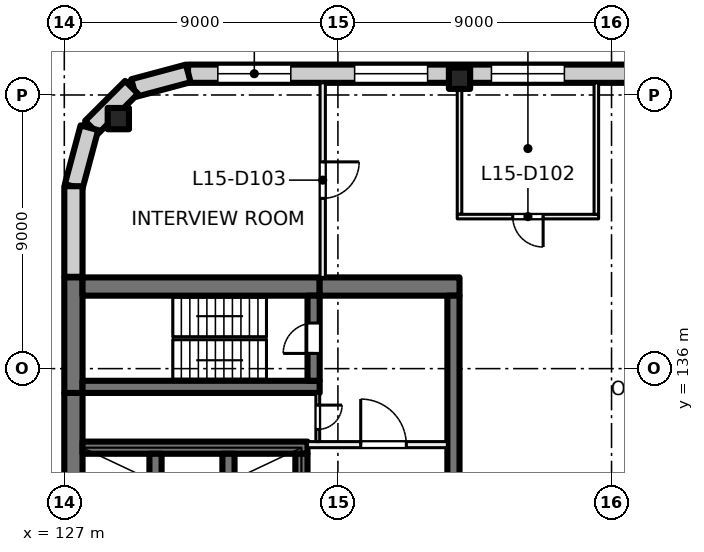
"""IFC4 building model, lengths in metres.
Left out: names, types, materials, properties, quantities, classifications, styles, units other than length and angle.
Written with IfcOpenShell. Run it as: python <this file> out.ifc"""

import sys

from ifc_helpers import new_model, si_unit, direction, frame, frame_2d, origin, origin_2d, place, context, subcontext, project, spatial, rectangle, extrude, element, fill, save


model = new_model("IFC4")
c1 = context("Model", 3, precision=1e-05, world=origin(), true_north=direction((0.0, 1.0)))
c2 = subcontext(c1, "Body", "Model", "MODEL_VIEW")
j1 = project(units=[si_unit("LENGTHUNIT", "METRE"), si_unit("PLANEANGLEUNIT", "RADIAN")], contexts=[c1])
p1 = place(None, origin())
s1 = spatial("IfcSite", under=j1, at=p1, CompositionType="ELEMENT")
p2 = place(p1, origin())
s2 = spatial("IfcBuilding", under=s1, at=p2, CompositionType="ELEMENT")
p3 = place(p2, frame((0.0, 0.0, 67.5)))
s3 = spatial("IfcBuildingStorey", under=s2, at=p3, CompositionType="ELEMENT", Elevation=67.5)
for number, where, z_axis, x_axis in (
    (1, (128.777, 144.223, 0.0), (0.0, 0.0, 1.0), (1.0, 0.0, 0.0)),
    (2, (140.0, 145.55, 0.0), (0.0, 0.0, 1.0), (1.0, 0.0, 0.0)),
):
    element("IfcColumn", number, at=place(p3, frame(where, z_axis=z_axis, x_axis=x_axis)), inside=s3, PredefinedType="COLUMN", context=c2, shape_type="SweptSolid", body=[
        extrude(rectangle(XDim=0.7, YDim=0.7, at=origin_2d()), origin(), (0.0, 0.0, 1.0), 4.0),
    ])
p4 = place(p3, frame((127.3, 120.8, 0.0), z_axis=(0.0, 0.0, 1.0), x_axis=(0.0, 1.0, 0.0)))
e3 = element("IfcWall", 3, at=p4, inside=s3, PredefinedType="SHEAR", context=c2, shape_type="SweptSolid", body=[
    extrude(rectangle(XDim=14.4, YDim=0.6, at=frame_2d((7.2, 0.0))), origin(), (0.0, 0.0, 1.0), 4.0),
])
p5 = place(p3, frame((127.3, 135.2, 0.0), z_axis=(0.0, 0.0, 1.0), x_axis=(0.0, 1.0, 0.0)))
e4 = element("IfcWall", 4, at=p5, inside=s3, PredefinedType="SHEAR", context=c2, shape_type="SweptSolid", body=[
    extrude(rectangle(XDim=3.8, YDim=0.6, at=frame_2d((1.9, 0.0))), origin(), (0.0, 0.0, 1.0), 4.0),
])
p6 = place(p3, frame((127.6, 138.7, 0.0), z_axis=(0.0, 0.0, 1.0), x_axis=(1.0, 0.0, 0.0)))
e5 = element("IfcWall", 5, at=p6, inside=s3, PredefinedType="SHEAR", context=c2, shape_type="SweptSolid", body=[
    extrude(rectangle(XDim=7.8, YDim=0.6, at=frame_2d((3.9, 0.0))), origin(), (0.0, 0.0, 1.0), 4.0),
])
p7 = place(p3, frame((135.4, 138.7, 0.0), z_axis=(0.0, 0.0, 1.0), x_axis=(1.0, 0.0, 0.0)))
e6 = element("IfcWall", 6, at=p7, inside=s3, PredefinedType="SHEAR", context=c2, shape_type="SweptSolid", body=[
    extrude(rectangle(XDim=4.6, YDim=0.6, at=frame_2d((2.3, 0.0))), origin(), (0.0, 0.0, 1.0), 4.0),
])
p8 = place(p3, frame((127.6, 135.4, 0.0), z_axis=(0.0, 0.0, 1.0), x_axis=(1.0, 0.0, 0.0)))
e7 = element("IfcWall", 7, at=p8, inside=s3, PredefinedType="SHEAR", context=c2, shape_type="SweptSolid", body=[
    extrude(rectangle(XDim=7.8, YDim=0.4, at=frame_2d((3.9, 0.0))), origin(), (0.0, 0.0, 1.0), 4.0),
])
p9 = place(p3, frame((135.2, 135.6, 0.0), z_axis=(0.0, 0.0, 1.0), x_axis=(0.0, 1.0, 0.0)))
e8 = element("IfcWall", 8, at=p9, inside=s3, PredefinedType="SHEAR", context=c2, shape_type="SweptSolid", body=[
    extrude(rectangle(XDim=2.8, YDim=0.4, at=frame_2d((1.4, 0.0))), origin(), (0.0, 0.0, 1.0), 4.0),
])
p10 = place(p9, frame((0.9, 0.0, 0.0)))
e9 = element("IfcOpeningElement", 9, at=p10, cuts=e8, PredefinedType="OPENING", context=c2, shape_type="SweptSolid", body=[
    extrude(rectangle(XDim=1.0, YDim=2.1, at=frame_2d((0.5, 1.05))), frame((0.0, 0.21, 0.0), z_axis=(0.0, -1.0, 0.0), x_axis=(1.0, 0.0, 0.0)), (0.0, 0.0, 1.0), 0.42),
])
p11 = place(p3, frame((127.6, 133.4, 0.0), z_axis=(0.0, 0.0, 1.0), x_axis=(1.0, 0.0, 0.0)))
e10 = element("IfcWall", 10, at=p11, inside=s3, PredefinedType="SHEAR", context=c2, shape_type="SweptSolid", body=[
    extrude(rectangle(XDim=7.4, YDim=0.4, at=frame_2d((3.7, 0.0))), origin(), (0.0, 0.0, 1.0), 4.0),
])
for number, where, z_axis, x_axis in (
    (11, (130.0, 130.2, 0.0), (0.0, 0.0, 1.0), (0.0, 1.0, 0.0)),
    (12, (132.4, 130.2, 0.0), (0.0, 0.0, 1.0), (0.0, 1.0, 0.0)),
):
    element("IfcWall", number, at=place(p3, frame(where, z_axis=z_axis, x_axis=x_axis)), inside=s3, PredefinedType="SHEAR", context=c2, shape_type="SweptSolid", body=[
        extrude(rectangle(XDim=3.0, YDim=0.4, at=frame_2d((1.5, 0.0))), origin(), (0.0, 0.0, 1.0), 4.0),
    ])
p12 = place(p3, frame((134.8, 130.2, 0.0), z_axis=(0.0, 0.0, 1.0), x_axis=(0.0, 1.0, 0.0)))
e13 = element("IfcWall", 13, at=p12, inside=s3, PredefinedType="SHEAR", context=c2, shape_type="SweptSolid", body=[
    extrude(rectangle(XDim=3.0, YDim=0.4, at=frame_2d((1.5, 0.0))), origin(), (0.0, 0.0, 1.0), 4.0),
])
p13 = place(p12, frame((0.95, 0.0, 0.0)))
e14 = element("IfcOpeningElement", 14, at=p13, cuts=e13, PredefinedType="OPENING", context=c2, shape_type="SweptSolid", body=[
    extrude(rectangle(XDim=1.1, YDim=2.1, at=frame_2d((0.55, 1.05))), frame((0.0, 0.21, 0.0), z_axis=(0.0, -1.0, 0.0), x_axis=(1.0, 0.0, 0.0)), (0.0, 0.0, 1.0), 0.42),
])
p14 = place(p3, frame((139.8, 129.8, 0.0), z_axis=(0.0, 0.0, 1.0), x_axis=(0.0, 1.0, 0.0)))
e15 = element("IfcWall", 15, at=p14, inside=s3, PredefinedType="SHEAR", context=c2, shape_type="SweptSolid", body=[
    extrude(rectangle(XDim=8.6, YDim=0.4, at=frame_2d((4.3, 0.0))), origin(), (0.0, 0.0, 1.0), 4.0),
])
p15 = place(p3, frame((131.07, 145.7, 0.0), z_axis=(0.0, 0.0, 1.0), x_axis=(1.0, 0.0, 0.0)))
e16 = element("IfcWall", 16, at=p15, inside=s3, PredefinedType="SOLIDWALL", context=c2, shape_type="SweptSolid", body=[
    extrude(rectangle(XDim=31.93, YDim=0.6, at=frame_2d((15.965, 0.0))), origin(), (0.0, 0.0, 1.0), 3.625),
])
p16 = place(p15, frame((0.98, 0.0, 0.9)))
e17 = element("IfcOpeningElement", 17, at=p16, cuts=e16, PredefinedType="OPENING", context=c2, shape_type="SweptSolid", body=[
    extrude(rectangle(XDim=2.4, YDim=2.4, at=frame_2d((1.2, 1.2))), frame((0.0, 0.31, 0.0), z_axis=(0.0, -1.0, 0.0), x_axis=(1.0, 0.0, 0.0)), (0.0, 0.0, 1.0), 0.62),
])
p17 = place(p15, frame((5.48, 0.0, 0.9)))
e18 = element("IfcOpeningElement", 18, at=p17, cuts=e16, PredefinedType="OPENING", context=c2, shape_type="SweptSolid", body=[
    extrude(rectangle(XDim=2.4, YDim=2.4, at=frame_2d((1.2, 1.2))), frame((0.0, 0.31, 0.0), z_axis=(0.0, -1.0, 0.0), x_axis=(1.0, 0.0, 0.0)), (0.0, 0.0, 1.0), 0.62),
])
p18 = place(p15, frame((9.98, 0.0, 0.9)))
e19 = element("IfcOpeningElement", 19, at=p18, cuts=e16, PredefinedType="OPENING", context=c2, shape_type="SweptSolid", body=[
    extrude(rectangle(XDim=2.4, YDim=2.4, at=frame_2d((1.2, 1.2))), frame((0.0, 0.31, 0.0), z_axis=(0.0, -1.0, 0.0), x_axis=(1.0, 0.0, 0.0)), (0.0, 0.0, 1.0), 0.62),
])
p19 = place(p15, frame((14.48, 0.0, 0.9)))
e20 = element("IfcOpeningElement", 20, at=p19, cuts=e16, PredefinedType="OPENING", context=c2, shape_type="SweptSolid", body=[
    extrude(rectangle(XDim=2.4, YDim=2.4, at=frame_2d((1.2, 1.2))), frame((0.0, 0.31, 0.0), z_axis=(0.0, -1.0, 0.0), x_axis=(1.0, 0.0, 0.0)), (0.0, 0.0, 1.0), 0.62),
])
p20 = place(p15, frame((18.98, 0.0, 0.9)))
e21 = element("IfcOpeningElement", 21, at=p20, cuts=e16, PredefinedType="OPENING", context=c2, shape_type="SweptSolid", body=[
    extrude(rectangle(XDim=2.4, YDim=2.4, at=frame_2d((1.2, 1.2))), frame((0.0, 0.31, 0.0), z_axis=(0.0, -1.0, 0.0), x_axis=(1.0, 0.0, 0.0)), (0.0, 0.0, 1.0), 0.62),
])
p21 = place(p15, frame((23.48, 0.0, 0.9)))
e22 = element("IfcOpeningElement", 22, at=p21, cuts=e16, PredefinedType="OPENING", context=c2, shape_type="SweptSolid", body=[
    extrude(rectangle(XDim=2.4, YDim=2.4, at=frame_2d((1.2, 1.2))), frame((0.0, 0.31, 0.0), z_axis=(0.0, -1.0, 0.0), x_axis=(1.0, 0.0, 0.0)), (0.0, 0.0, 1.0), 0.62),
])
p22 = place(p15, frame((27.98, 0.0, 0.9)))
e23 = element("IfcOpeningElement", 23, at=p22, cuts=e16, PredefinedType="OPENING", context=c2, shape_type="SweptSolid", body=[
    extrude(rectangle(XDim=2.4, YDim=2.4, at=frame_2d((1.2, 1.2))), frame((0.0, 0.31, 0.0), z_axis=(0.0, -1.0, 0.0), x_axis=(1.0, 0.0, 0.0)), (0.0, 0.0, 1.0), 0.62),
])
for number, where, z_axis, x_axis in (
    (24, (129.281, 145.229, 0.0), (0.0, 0.0, 1.0), (0.966, 0.259, 0.0)),
    (25, (127.896, 143.936, 0.0), (0.0, 0.0, 1.0), (0.707, 0.707, 0.0)),
):
    element("IfcWall", number, at=place(p3, frame(where, z_axis=z_axis, x_axis=x_axis)), inside=s3, PredefinedType="SOLIDWALL", context=c2, shape_type="SweptSolid", body=[
        extrude(rectangle(XDim=1.861, YDim=0.6, at=frame_2d((0.93, 0.0))), origin(), (0.0, 0.0, 1.0), 3.625),
    ])
p23 = place(p3, frame((127.308, 141.99, 0.0), z_axis=(0.0, 0.0, 1.0), x_axis=(0.258839784042, 0.965920269068, 0.0)))
e26 = element("IfcWall", 26, at=p23, inside=s3, PredefinedType="SOLIDWALL", context=c2, shape_type="SweptSolid", body=[
    extrude(rectangle(XDim=2.0, YDim=0.6, at=frame_2d((1.0, 0.0))), origin(), (0.0, 0.0, 1.0), 3.625),
])
p24 = place(p3, frame((127.3, 139.02, 0.0), z_axis=(0.0, 0.0, 1.0), x_axis=(0.0, 1.0, 0.0)))
e27 = element("IfcWall", 27, at=p24, inside=s3, PredefinedType="SOLIDWALL", context=c2, shape_type="SweptSolid", body=[
    extrude(rectangle(XDim=2.98, YDim=0.6, at=frame_2d((1.49, 0.0))), origin(), (0.0, 0.0, 1.0), 3.625),
])
p25 = place(p3, frame((135.0, 133.5, 0.0), z_axis=(0.0, 0.0, 1.0), x_axis=(1.0, 0.0, 0.0)))
e28 = element("IfcWall", 28, at=p25, inside=s3, PredefinedType="PARTITIONING", context=c2, shape_type="SweptSolid", body=[
    extrude(rectangle(XDim=4.6, YDim=0.2, at=frame_2d((2.3, 0.0))), origin(), (0.0, 0.0, 1.0), 3.625),
])
p26 = place(p25, frame((1.75, 0.0, 0.0)))
e29 = element("IfcOpeningElement", 29, at=p26, cuts=e28, PredefinedType="OPENING", context=c2, shape_type="SweptSolid", body=[
    extrude(rectangle(XDim=1.5, YDim=2.1, at=frame_2d((0.75, 1.05))), frame((0.0, 0.11, 0.0), z_axis=(0.0, -1.0, 0.0), x_axis=(1.0, 0.0, 0.0)), (0.0, 0.0, 1.0), 0.22),
])
p27 = place(p3, frame((135.337, 135.2, 0.0), z_axis=(0.0, 0.0, 1.0), x_axis=(0.0, -1.0, 0.0)))
e30 = element("IfcWall", 30, at=p27, inside=s3, PredefinedType="PARTITIONING", context=c2, shape_type="SweptSolid", body=[
    extrude(rectangle(XDim=1.6, YDim=0.125, at=frame_2d((0.8, 0.0))), origin(), (0.0, 0.0, 1.0), 3.625),
])
p28 = place(p27, frame((0.4, 0.0, 0.0)))
e31 = element("IfcOpeningElement", 31, at=p28, cuts=e30, PredefinedType="OPENING", context=c2, shape_type="SweptSolid", body=[
    extrude(rectangle(XDim=0.8, YDim=2.1, at=frame_2d((0.4, 1.05))), frame((0.0, 0.073, 0.0), z_axis=(0.0, -1.0, 0.0), x_axis=(1.0, 0.0, 0.0)), (0.0, 0.0, 1.0), 0.145),
])
p29 = place(p3, frame((135.5, 145.4, 0.0), z_axis=(0.0, 0.0, 1.0), x_axis=(0.0, -1.0, 0.0)))
e32 = element("IfcWall", 32, at=p29, inside=s3, PredefinedType="PARTITIONING", context=c2, shape_type="SweptSolid", body=[
    extrude(rectangle(XDim=6.4, YDim=0.175, at=frame_2d((3.2, 0.0))), origin(), (0.0, 0.0, 1.0), 3.625),
])
p30 = place(p29, frame((2.6, 0.0, 0.0)))
e33 = element("IfcOpeningElement", 33, at=p30, cuts=e32, PredefinedType="OPENING", context=c2, shape_type="SweptSolid", body=[
    extrude(rectangle(XDim=1.2, YDim=2.1, at=frame_2d((0.6, 1.05))), frame((0.0, 0.097, 0.0), z_axis=(0.0, -1.0, 0.0), x_axis=(1.0, 0.0, 0.0)), (0.0, 0.0, 1.0), 0.195),
])
p31 = place(p3, frame((140.0, 141.075, 0.0), z_axis=(0.0, 0.0, 1.0), x_axis=(0.0, 1.0, 0.0)))
e34 = element("IfcWall", 34, at=p31, inside=s3, PredefinedType="PARTITIONING", context=c2, shape_type="SweptSolid", body=[
    extrude(rectangle(XDim=4.325, YDim=0.15, at=frame_2d((2.163, 0.0))), origin(), (0.0, 0.0, 1.0), 3.625),
])
p32 = place(p3, frame((144.575, 141.0, 0.0), z_axis=(0.0, 0.0, 1.0), x_axis=(-1.0, 0.0, 0.0)))
e35 = element("IfcWall", 35, at=p32, inside=s3, PredefinedType="PARTITIONING", context=c2, shape_type="SweptSolid", body=[
    extrude(rectangle(XDim=4.65, YDim=0.15, at=frame_2d((2.325, 0.0))), origin(), (0.0, 0.0, 1.0), 3.625),
])
p33 = place(p32, frame((1.825, 0.0, 0.0)))
e36 = element("IfcOpeningElement", 36, at=p33, cuts=e35, PredefinedType="OPENING", context=c2, shape_type="SweptSolid", body=[
    extrude(rectangle(XDim=1.0, YDim=2.1, at=frame_2d((0.5, 1.05))), frame((0.0, 0.085, 0.0), z_axis=(0.0, -1.0, 0.0), x_axis=(1.0, 0.0, 0.0)), (0.0, 0.0, 1.0), 0.17),
])
p34 = place(p3, frame((144.5, 145.4, 0.0), z_axis=(0.0, 0.0, 1.0), x_axis=(0.0, -1.0, 0.0)))
e37 = element("IfcWall", 37, at=p34, inside=s3, PredefinedType="PARTITIONING", context=c2, shape_type="SweptSolid", body=[
    extrude(rectangle(XDim=4.325, YDim=0.15, at=frame_2d((2.163, 0.0))), origin(), (0.0, 0.0, 1.0), 3.625),
])
p35 = place(p16, origin())
e38 = element("IfcWindow", 38, at=p35, inside=s3, PartitioningType="SINGLE_PANEL", PredefinedType="WINDOW", context=c2, shape_type="SweptSolid", body=[
    extrude(rectangle(XDim=2.4, YDim=2.4, at=frame_2d((1.2, 1.2))), frame((0.0, 0.03, 0.0), z_axis=(0.0, -1.0, 0.0), x_axis=(1.0, 0.0, 0.0)), (0.0, 0.0, 1.0), 0.06),
])
fill(e17, e38)
p36 = place(p17, origin())
e39 = element("IfcWindow", 39, at=p36, inside=s3, PartitioningType="SINGLE_PANEL", PredefinedType="WINDOW", context=c2, shape_type="SweptSolid", body=[
    extrude(rectangle(XDim=2.4, YDim=2.4, at=frame_2d((1.2, 1.2))), frame((0.0, 0.03, 0.0), z_axis=(0.0, -1.0, 0.0), x_axis=(1.0, 0.0, 0.0)), (0.0, 0.0, 1.0), 0.06),
])
fill(e18, e39)
p37 = place(p18, origin())
e40 = element("IfcWindow", 40, at=p37, inside=s3, PartitioningType="SINGLE_PANEL", PredefinedType="WINDOW", context=c2, shape_type="SweptSolid", body=[
    extrude(rectangle(XDim=2.4, YDim=2.4, at=frame_2d((1.2, 1.2))), frame((0.0, 0.03, 0.0), z_axis=(0.0, -1.0, 0.0), x_axis=(1.0, 0.0, 0.0)), (0.0, 0.0, 1.0), 0.06),
])
fill(e19, e40)
p38 = place(p26, origin())
e41 = element("IfcDoor", 41, at=p38, inside=s3, OperationType="DOUBLE_DOOR_SINGLE_SWING", PredefinedType="DOOR", context=c2, shape_type="SweptSolid", body=[
    extrude(rectangle(XDim=1.5, YDim=2.1, at=frame_2d((0.75, 1.05))), frame((0.0, 0.025, 0.0), z_axis=(0.0, -1.0, 0.0), x_axis=(1.0, 0.0, 0.0)), (0.0, 0.0, 1.0), 0.05),
])
fill(e29, e41)
p39 = place(p10, origin())
e42 = element("IfcDoor", 42, at=p39, inside=s3, OperationType="SINGLE_SWING_LEFT", PredefinedType="DOOR", context=c2, shape_type="SweptSolid", body=[
    extrude(rectangle(XDim=1.0, YDim=2.1, at=frame_2d((0.5, 1.05))), frame((0.0, 0.025, 0.0), z_axis=(0.0, -1.0, 0.0), x_axis=(1.0, 0.0, 0.0)), (0.0, 0.0, 1.0), 0.05),
])
fill(e9, e42)
p40 = place(p28, origin())
e43 = element("IfcDoor", 43, at=p40, inside=s3, OperationType="SINGLE_SWING_RIGHT", PredefinedType="DOOR", context=c2, shape_type="SweptSolid", body=[
    extrude(rectangle(XDim=0.8, YDim=2.1, at=frame_2d((0.4, 1.05))), frame((0.0, 0.025, 0.0), z_axis=(0.0, -1.0, 0.0), x_axis=(1.0, 0.0, 0.0)), (0.0, 0.0, 1.0), 0.05),
])
fill(e31, e43)
p41 = place(p33, origin())
e44 = element("IfcDoor", 44, at=p41, inside=s3, OperationType="SINGLE_SWING_LEFT", PredefinedType="DOOR", context=c2, shape_type="SweptSolid", body=[
    extrude(rectangle(XDim=1.0, YDim=2.1, at=frame_2d((0.5, 1.05))), frame((0.0, 0.025, 0.0), z_axis=(0.0, -1.0, 0.0), x_axis=(1.0, 0.0, 0.0)), (0.0, 0.0, 1.0), 0.05),
])
fill(e36, e44)
p42 = place(p30, origin())
e45 = element("IfcDoor", 45, at=p42, inside=s3, OperationType="DOUBLE_DOOR_SINGLE_SWING", PredefinedType="DOOR", context=c2, shape_type="SweptSolid", body=[
    extrude(rectangle(XDim=1.2, YDim=2.1, at=frame_2d((0.6, 1.05))), frame((0.0, 0.025, 0.0), z_axis=(0.0, -1.0, 0.0), x_axis=(1.0, 0.0, 0.0)), (0.0, 0.0, 1.0), 0.05),
])
fill(e33, e45)
save(model, sys.argv[1])
